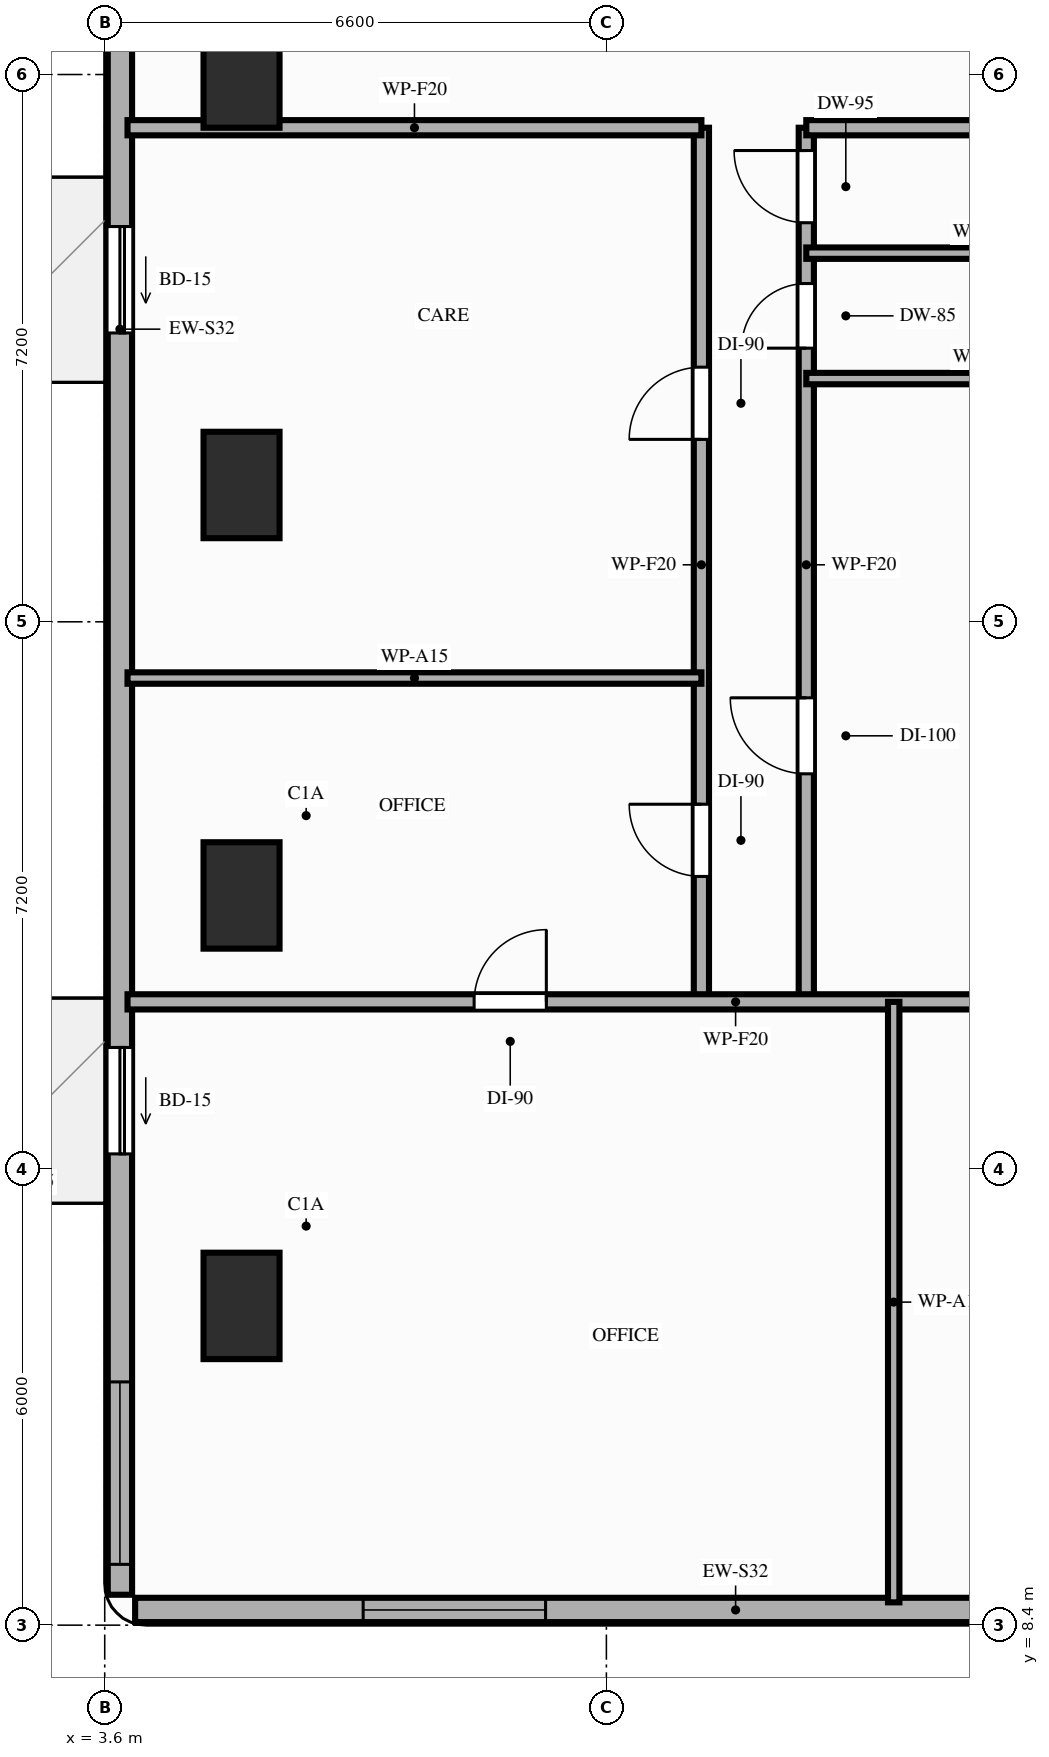
"""IFC4 building model, lengths in metres.
Left out: names, types, materials, properties, quantities, classifications, styles, units other than length and angle.
Written with IfcOpenShell. Run it as: python <this file> out.ifc"""

import sys

from ifc_helpers import new_model, si_unit, direction, frame, frame_2d, origin, origin_2d, place, context, subcontext, project, spatial, rectangle, extrude, element, fill, save


model = new_model("IFC4")
c1 = context("Model", 3, precision=1e-05, world=origin(), true_north=direction((0.0, 1.0)))
c2 = subcontext(c1, "Body", "Model", "MODEL_VIEW")
j1 = project(units=[si_unit("LENGTHUNIT", "METRE"), si_unit("PLANEANGLEUNIT", "RADIAN")], contexts=[c1])
p1 = place(None, origin())
s1 = spatial("IfcSite", under=j1, at=p1, CompositionType="ELEMENT")
p2 = place(p1, origin())
s2 = spatial("IfcBuilding", under=s1, at=p2, CompositionType="ELEMENT")
p3 = place(p2, frame((0.0, 0.0, 26.4)))
s3 = spatial("IfcBuildingStorey", under=s2, at=p3, CompositionType="ELEMENT", Elevation=26.4)
for number, where, z_axis, x_axis in (
    (1, (5.4, 12.6, -0.32), (0.0, 0.0, 1.0), (1.0, 0.0, 0.0)),
    (2, (5.4, 18.0, -0.32), (0.0, 0.0, 1.0), (1.0, 0.0, 0.0)),
    (3, (5.4, 23.4, -0.32), (0.0, 0.0, 1.0), (1.0, 0.0, 0.0)),
    (4, (5.4, 28.8, -0.32), (0.0, 0.0, 1.0), (1.0, 0.0, 0.0)),
):
    element("IfcColumn", number, at=place(p3, frame(where, z_axis=z_axis, x_axis=x_axis)), inside=s3, PredefinedType="COLUMN", context=c2, shape_type="SweptSolid", body=[
        extrude(rectangle(XDim=1.0, YDim=1.4, at=origin_2d()), origin(), (0.0, 0.0, 1.0), 4.12),
    ])
p4 = place(p3, frame((4.0, 8.6, 0.0), z_axis=(0.0, 0.0, 1.0), x_axis=(1.0, 0.0, 0.0)))
e5 = element("IfcWall", 5, at=p4, inside=s3, PredefinedType="STANDARD", context=c2, shape_type="SweptSolid", body=[
    extrude(rectangle(XDim=15.8, YDim=0.32, at=frame_2d((7.9, 0.0))), origin(), (0.0, 0.0, 1.0), 3.62),
])
p5 = place(p4, frame((3.0, 0.0, 0.85)))
e6 = element("IfcOpeningElement", 6, at=p5, cuts=e5, PredefinedType="OPENING", context=c2, shape_type="SweptSolid", body=[
    extrude(rectangle(XDim=2.4, YDim=1.8, at=frame_2d((1.2, 0.9))), frame((0.0, 0.17, 0.0), z_axis=(0.0, -1.0, 0.0), x_axis=(1.0, 0.0, 0.0)), (0.0, 0.0, 1.0), 0.34),
])
p6 = place(p4, frame((11.2, 0.0, 0.85)))
e7 = element("IfcOpeningElement", 7, at=p6, cuts=e5, PredefinedType="OPENING", context=c2, shape_type="SweptSolid", body=[
    extrude(rectangle(XDim=2.4, YDim=1.8, at=frame_2d((1.2, 0.9))), frame((0.0, 0.17, 0.0), z_axis=(0.0, -1.0, 0.0), x_axis=(1.0, 0.0, 0.0)), (0.0, 0.0, 1.0), 0.34),
])
p7 = place(p3, frame((3.8, 42.1, 0.0), z_axis=(0.0, 0.0, 1.0), x_axis=(0.0, -1.0, 0.0)))
e8 = element("IfcWall", 8, at=p7, inside=s3, PredefinedType="STANDARD", context=c2, shape_type="SweptSolid", body=[
    extrude(rectangle(XDim=33.3, YDim=0.32, at=frame_2d((16.65, 0.0))), origin(), (0.0, 0.0, 1.0), 3.3),
])
p8 = place(p7, frame((26.1, 0.0, 0.0)))
e9 = element("IfcOpeningElement", 9, at=p8, cuts=e8, PredefinedType="OPENING", context=c2, shape_type="SweptSolid", body=[
    extrude(rectangle(XDim=1.4, YDim=2.1, at=frame_2d((0.7, 1.05))), frame((0.0, 0.17, 0.0), z_axis=(0.0, -1.0, 0.0), x_axis=(1.0, 0.0, 0.0)), (0.0, 0.0, 1.0), 0.34),
])
p9 = place(p7, frame((15.3, 0.0, 0.0)))
e10 = element("IfcOpeningElement", 10, at=p9, cuts=e8, PredefinedType="OPENING", context=c2, shape_type="SweptSolid", body=[
    extrude(rectangle(XDim=1.4, YDim=2.1, at=frame_2d((0.7, 1.05))), frame((0.0, 0.17, 0.0), z_axis=(0.0, -1.0, 0.0), x_axis=(1.0, 0.0, 0.0)), (0.0, 0.0, 1.0), 0.34),
])
p10 = place(p7, frame((30.5, 0.0, 0.85)))
e11 = element("IfcOpeningElement", 11, at=p10, cuts=e8, PredefinedType="OPENING", context=c2, shape_type="SweptSolid", body=[
    extrude(rectangle(XDim=2.4, YDim=1.8, at=frame_2d((1.2, 0.9))), frame((0.0, 0.17, 0.0), z_axis=(0.0, -1.0, 0.0), x_axis=(1.0, 0.0, 0.0)), (0.0, 0.0, 1.0), 0.34),
])
p11 = place(p7, frame((9.6, 0.0, 0.85)))
e12 = element("IfcOpeningElement", 12, at=p11, cuts=e8, PredefinedType="OPENING", context=c2, shape_type="SweptSolid", body=[
    extrude(rectangle(XDim=2.4, YDim=1.8, at=frame_2d((1.2, 0.9))), frame((0.0, 0.17, 0.0), z_axis=(0.0, -1.0, 0.0), x_axis=(1.0, 0.0, 0.0)), (0.0, 0.0, 1.0), 0.34),
])
p12 = place(p7, frame((3.5, 0.0, 0.85)))
e13 = element("IfcOpeningElement", 13, at=p12, cuts=e8, PredefinedType="OPENING", context=c2, shape_type="SweptSolid", body=[
    extrude(rectangle(XDim=2.4, YDim=1.8, at=frame_2d((1.2, 0.9))), frame((0.0, 0.17, 0.0), z_axis=(0.0, -1.0, 0.0), x_axis=(1.0, 0.0, 0.0)), (0.0, 0.0, 1.0), 0.34),
])
p13 = place(p3, frame((11.45, 16.6, 0.0), z_axis=(0.0, 0.0, 1.0), x_axis=(0.0, 1.0, 0.0)))
e14 = element("IfcWall", 14, at=p13, inside=s3, PredefinedType="PARTITIONING", context=c2, shape_type="SweptSolid", body=[
    extrude(rectangle(XDim=11.5, YDim=0.2, at=frame_2d((5.75, 0.0))), origin(), (0.0, 0.0, 1.0), 3.0),
])
p14 = place(p13, frame((1.65, 0.0, 0.0)))
e15 = element("IfcOpeningElement", 15, at=p14, cuts=e14, PredefinedType="OPENING", context=c2, shape_type="SweptSolid", body=[
    extrude(rectangle(XDim=0.95, YDim=2.15, at=frame_2d((0.475, 1.075))), frame((0.0, 0.11, 0.0), z_axis=(0.0, -1.0, 0.0), x_axis=(1.0, 0.0, 0.0)), (0.0, 0.0, 1.0), 0.22),
])
p15 = place(p13, frame((7.4, 0.0, 0.0)))
e16 = element("IfcOpeningElement", 16, at=p15, cuts=e14, PredefinedType="OPENING", context=c2, shape_type="SweptSolid", body=[
    extrude(rectangle(XDim=0.95, YDim=2.15, at=frame_2d((0.475, 1.075))), frame((0.0, 0.11, 0.0), z_axis=(0.0, -1.0, 0.0), x_axis=(1.0, 0.0, 0.0)), (0.0, 0.0, 1.0), 0.22),
])
p16 = place(p3, frame((12.83, 16.6, 0.0), z_axis=(0.0, 0.0, 1.0), x_axis=(0.0, 1.0, 0.0)))
e17 = element("IfcWall", 17, at=p16, inside=s3, PredefinedType="PARTITIONING", context=c2, shape_type="SweptSolid", body=[
    extrude(rectangle(XDim=11.5, YDim=0.2, at=frame_2d((5.75, 0.0))), origin(), (0.0, 0.0, 1.0), 3.0),
])
p17 = place(p16, frame((3.0, 0.0, 0.0)))
e18 = element("IfcOpeningElement", 18, at=p17, cuts=e17, PredefinedType="OPENING", context=c2, shape_type="SweptSolid", body=[
    extrude(rectangle(XDim=1.0, YDim=2.15, at=frame_2d((0.5, 1.075))), frame((0.0, 0.11, 0.0), z_axis=(0.0, -1.0, 0.0), x_axis=(1.0, 0.0, 0.0)), (0.0, 0.0, 1.0), 0.22),
])
p18 = place(p16, frame((8.6, 0.0, 0.0)))
e19 = element("IfcOpeningElement", 19, at=p18, cuts=e17, PredefinedType="OPENING", context=c2, shape_type="SweptSolid", body=[
    extrude(rectangle(XDim=0.85, YDim=2.1, at=frame_2d((0.425, 1.05))), frame((0.0, 0.11, 0.0), z_axis=(0.0, -1.0, 0.0), x_axis=(1.0, 0.0, 0.0)), (0.0, 0.0, 1.0), 0.22),
])
p19 = place(p16, frame((10.25, 0.0, 0.0)))
e20 = element("IfcOpeningElement", 20, at=p19, cuts=e17, PredefinedType="OPENING", context=c2, shape_type="SweptSolid", body=[
    extrude(rectangle(XDim=0.95, YDim=2.1, at=frame_2d((0.475, 1.05))), frame((0.0, 0.11, 0.0), z_axis=(0.0, -1.0, 0.0), x_axis=(1.0, 0.0, 0.0)), (0.0, 0.0, 1.0), 0.22),
])
p20 = place(p3, frame((3.9, 16.6, 0.0), z_axis=(0.0, 0.0, 1.0), x_axis=(1.0, 0.0, 0.0)))
e21 = element("IfcWall", 21, at=p20, inside=s3, PredefinedType="PARTITIONING", context=c2, shape_type="SweptSolid", body=[
    extrude(rectangle(XDim=16.0, YDim=0.2, at=frame_2d((8.0, 0.0))), origin(), (0.0, 0.0, 1.0), 3.0),
])
p21 = place(p20, frame((4.56, 0.0, 0.0)))
e22 = element("IfcOpeningElement", 22, at=p21, cuts=e21, PredefinedType="OPENING", context=c2, shape_type="SweptSolid", body=[
    extrude(rectangle(XDim=0.95, YDim=2.15, at=frame_2d((0.475, 1.075))), frame((0.0, 0.11, 0.0), z_axis=(0.0, -1.0, 0.0), x_axis=(1.0, 0.0, 0.0)), (0.0, 0.0, 1.0), 0.22),
])
p22 = place(p20, frame((12.56, 0.0, 0.0)))
e23 = element("IfcOpeningElement", 23, at=p22, cuts=e21, PredefinedType="OPENING", context=c2, shape_type="SweptSolid", body=[
    extrude(rectangle(XDim=0.95, YDim=2.15, at=frame_2d((0.475, 1.075))), frame((0.0, 0.11, 0.0), z_axis=(0.0, -1.0, 0.0), x_axis=(1.0, 0.0, 0.0)), (0.0, 0.0, 1.0), 0.22),
])
p23 = place(p3, frame((3.9, 28.1, 0.0), z_axis=(0.0, 0.0, 1.0), x_axis=(1.0, 0.0, 0.0)))
e24 = element("IfcWall", 24, at=p23, inside=s3, PredefinedType="PARTITIONING", context=c2, shape_type="SweptSolid", body=[
    extrude(rectangle(XDim=7.55, YDim=0.2, at=frame_2d((3.775, 0.0))), origin(), (0.0, 0.0, 1.0), 3.0),
])
p24 = place(p3, frame((12.83, 28.1, 0.0), z_axis=(0.0, 0.0, 1.0), x_axis=(1.0, 0.0, 0.0)))
e25 = element("IfcWall", 25, at=p24, inside=s3, PredefinedType="PARTITIONING", context=c2, shape_type="SweptSolid", body=[
    extrude(rectangle(XDim=7.07, YDim=0.2, at=frame_2d((3.535, 0.0))), origin(), (0.0, 0.0, 1.0), 3.0),
])
p25 = place(p3, frame((3.9, 20.86, 0.0), z_axis=(0.0, 0.0, 1.0), x_axis=(1.0, 0.0, 0.0)))
e26 = element("IfcWall", 26, at=p25, inside=s3, PredefinedType="PARTITIONING", context=c2, shape_type="SweptSolid", body=[
    extrude(rectangle(XDim=7.55, YDim=0.15, at=frame_2d((3.775, 0.0))), origin(), (0.0, 0.0, 1.0), 3.0),
])
p26 = place(p3, frame((13.98, 8.7, 0.0), z_axis=(0.0, 0.0, 1.0), x_axis=(0.0, 1.0, 0.0)))
e27 = element("IfcWall", 27, at=p26, inside=s3, PredefinedType="PARTITIONING", context=c2, shape_type="SweptSolid", body=[
    extrude(rectangle(XDim=7.9, YDim=0.15, at=frame_2d((3.95, 0.0))), origin(), (0.0, 0.0, 1.0), 3.0),
])
p27 = place(p3, frame((12.83, 24.8, 0.0), z_axis=(0.0, 0.0, 1.0), x_axis=(1.0, 0.0, 0.0)))
e28 = element("IfcWall", 28, at=p27, inside=s3, PredefinedType="PARTITIONING", context=c2, shape_type="SweptSolid", body=[
    extrude(rectangle(XDim=4.8, YDim=0.15, at=frame_2d((2.4, 0.0))), origin(), (0.0, 0.0, 1.0), 3.3),
])
p28 = place(p3, frame((12.83, 26.45, 0.0), z_axis=(0.0, 0.0, 1.0), x_axis=(1.0, 0.0, 0.0)))
e29 = element("IfcWall", 29, at=p28, inside=s3, PredefinedType="PARTITIONING", context=c2, shape_type="SweptSolid", body=[
    extrude(rectangle(XDim=4.8, YDim=0.15, at=frame_2d((2.4, 0.0))), origin(), (0.0, 0.0, 1.0), 3.62),
])
p29 = place(p8, origin())
e30 = element("IfcDoor", 30, at=p29, inside=s3, OperationType="SLIDING_TO_RIGHT", PredefinedType="DOOR", context=c2, shape_type="SweptSolid", body=[
    extrude(rectangle(XDim=1.4, YDim=2.1, at=frame_2d((0.7, 1.05))), frame((0.0, 0.025, 0.0), z_axis=(0.0, -1.0, 0.0), x_axis=(1.0, 0.0, 0.0)), (0.0, 0.0, 1.0), 0.05),
])
fill(e9, e30)
p30 = place(p9, origin())
e31 = element("IfcDoor", 31, at=p30, inside=s3, OperationType="SLIDING_TO_RIGHT", PredefinedType="DOOR", context=c2, shape_type="SweptSolid", body=[
    extrude(rectangle(XDim=1.4, YDim=2.1, at=frame_2d((0.7, 1.05))), frame((0.0, 0.025, 0.0), z_axis=(0.0, -1.0, 0.0), x_axis=(1.0, 0.0, 0.0)), (0.0, 0.0, 1.0), 0.05),
])
fill(e10, e31)
p31 = place(p10, origin())
e32 = element("IfcWindow", 32, at=p31, inside=s3, PartitioningType="SINGLE_PANEL", PredefinedType="WINDOW", context=c2, shape_type="SweptSolid", body=[
    extrude(rectangle(XDim=2.4, YDim=1.8, at=frame_2d((1.2, 0.9))), frame((0.0, 0.03, 0.0), z_axis=(0.0, -1.0, 0.0), x_axis=(1.0, 0.0, 0.0)), (0.0, 0.0, 1.0), 0.06),
])
fill(e11, e32)
p32 = place(p5, origin())
e33 = element("IfcWindow", 33, at=p32, inside=s3, PartitioningType="SINGLE_PANEL", PredefinedType="WINDOW", context=c2, shape_type="SweptSolid", body=[
    extrude(rectangle(XDim=2.4, YDim=1.8, at=frame_2d((1.2, 0.9))), frame((0.0, 0.03, 0.0), z_axis=(0.0, -1.0, 0.0), x_axis=(1.0, 0.0, 0.0)), (0.0, 0.0, 1.0), 0.06),
])
fill(e6, e33)
p33 = place(p14, origin())
e34 = element("IfcDoor", 34, at=p33, inside=s3, OperationType="SINGLE_SWING_RIGHT", PredefinedType="DOOR", context=c2, shape_type="SweptSolid", body=[
    extrude(rectangle(XDim=0.95, YDim=2.15, at=frame_2d((0.475, 1.075))), frame((0.0, 0.025, 0.0), z_axis=(0.0, -1.0, 0.0), x_axis=(1.0, 0.0, 0.0)), (0.0, 0.0, 1.0), 0.05),
])
fill(e15, e34)
p34 = place(p15, origin())
e35 = element("IfcDoor", 35, at=p34, inside=s3, OperationType="SINGLE_SWING_LEFT", PredefinedType="DOOR", context=c2, shape_type="SweptSolid", body=[
    extrude(rectangle(XDim=0.95, YDim=2.15, at=frame_2d((0.475, 1.075))), frame((0.0, 0.025, 0.0), z_axis=(0.0, -1.0, 0.0), x_axis=(1.0, 0.0, 0.0)), (0.0, 0.0, 1.0), 0.05),
])
fill(e16, e35)
p35 = place(p21, origin())
e36 = element("IfcDoor", 36, at=p35, inside=s3, OperationType="SINGLE_SWING_RIGHT", PredefinedType="DOOR", context=c2, shape_type="SweptSolid", body=[
    extrude(rectangle(XDim=0.95, YDim=2.15, at=frame_2d((0.475, 1.075))), frame((0.0, 0.025, 0.0), z_axis=(0.0, -1.0, 0.0), x_axis=(1.0, 0.0, 0.0)), (0.0, 0.0, 1.0), 0.05),
])
fill(e22, e36)
p36 = place(p17, origin())
e37 = element("IfcDoor", 37, at=p36, inside=s3, OperationType="SINGLE_SWING_RIGHT", PredefinedType="DOOR", context=c2, shape_type="SweptSolid", body=[
    extrude(rectangle(XDim=1.0, YDim=2.15, at=frame_2d((0.5, 1.075))), frame((0.0, 0.025, 0.0), z_axis=(0.0, -1.0, 0.0), x_axis=(1.0, 0.0, 0.0)), (0.0, 0.0, 1.0), 0.05),
])
fill(e18, e37)
p37 = place(p18, origin())
e38 = element("IfcDoor", 38, at=p37, inside=s3, OperationType="SINGLE_SWING_LEFT", PredefinedType="DOOR", context=c2, shape_type="SweptSolid", body=[
    extrude(rectangle(XDim=0.85, YDim=2.1, at=frame_2d((0.425, 1.05))), frame((0.0, 0.025, 0.0), z_axis=(0.0, -1.0, 0.0), x_axis=(1.0, 0.0, 0.0)), (0.0, 0.0, 1.0), 0.05),
])
fill(e19, e38)
p38 = place(p19, origin())
e39 = element("IfcDoor", 39, at=p38, inside=s3, OperationType="SINGLE_SWING_RIGHT", PredefinedType="DOOR", context=c2, shape_type="SweptSolid", body=[
    extrude(rectangle(XDim=0.95, YDim=2.1, at=frame_2d((0.475, 1.05))), frame((0.0, 0.025, 0.0), z_axis=(0.0, -1.0, 0.0), x_axis=(1.0, 0.0, 0.0)), (0.0, 0.0, 1.0), 0.05),
])
fill(e20, e39)
save(model, sys.argv[1])
